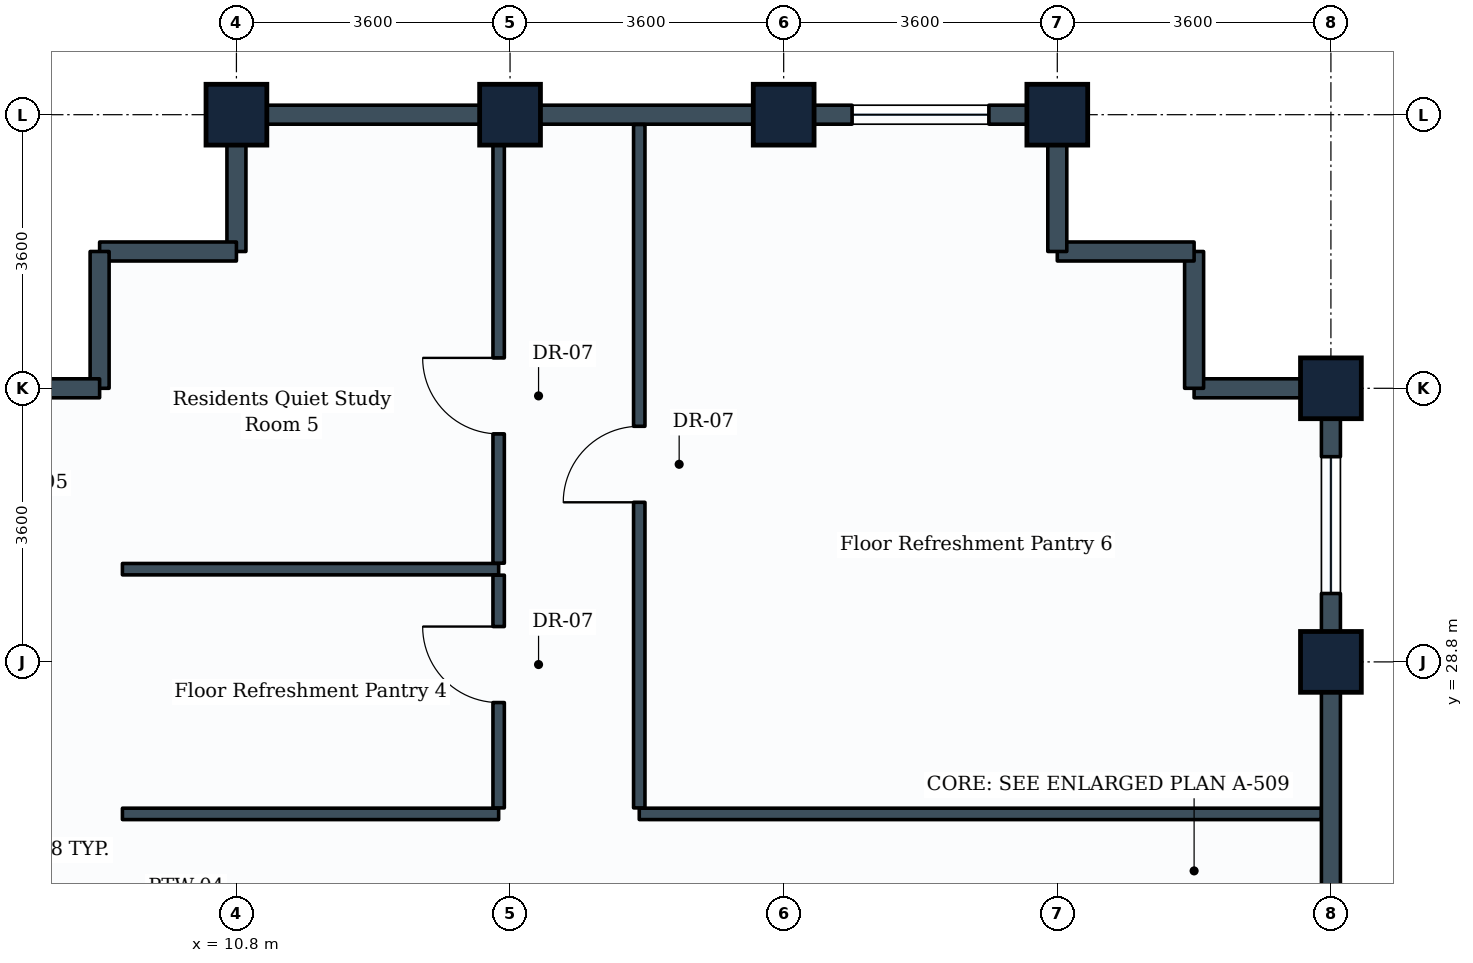
"""IFC4 building model, lengths in metres.
Left out: names, types, materials, properties, quantities, classifications, styles, units other than length and angle.
Written with IfcOpenShell. Run it as: python <this file> out.ifc"""

import sys

from ifc_helpers import new_model, si_unit, direction, frame, frame_2d, origin, origin_2d, place, context, subcontext, project, spatial, rectangle, extrude, element, fill, save


model = new_model("IFC4")
c1 = context("Model", 3, precision=1e-05, world=origin(), true_north=direction((0.0, 1.0)))
c2 = subcontext(c1, "Body", "Model", "MODEL_VIEW")
j1 = project(units=[si_unit("LENGTHUNIT", "METRE"), si_unit("PLANEANGLEUNIT", "RADIAN")], contexts=[c1])
p1 = place(None, origin())
s1 = spatial("IfcSite", under=j1, at=p1, CompositionType="ELEMENT")
p2 = place(p1, origin())
s2 = spatial("IfcBuilding", under=s1, at=p2, CompositionType="ELEMENT")
p3 = place(p2, frame((0.0, 0.0, 266.6)))
s3 = spatial("IfcBuildingStorey", under=s2, at=p3, CompositionType="ELEMENT", Elevation=266.6)
for number, where, z_axis, x_axis in (
    (1, (10.8, 36.0, 0.0), (0.0, 0.0, 1.0), (1.0, 0.0, 0.0)),
    (2, (14.4, 36.0, 0.0), (0.0, 0.0, 1.0), (1.0, 0.0, 0.0)),
    (3, (18.0, 36.0, 0.0), (0.0, 0.0, 1.0), (1.0, 0.0, 0.0)),
    (4, (21.6, 36.0, 0.0), (0.0, 0.0, 1.0), (1.0, 0.0, 0.0)),
    (5, (25.2, 28.8, 0.0), (0.0, 0.0, 1.0), (0.0, 1.0, 0.0)),
    (6, (25.2, 32.4, 0.0), (0.0, 0.0, 1.0), (0.0, 1.0, 0.0)),
):
    element("IfcColumn", number, at=place(p3, frame(where, z_axis=z_axis, x_axis=x_axis)), inside=s3, PredefinedType="COLUMN", context=c2, shape_type="SweptSolid", body=[
        extrude(rectangle(XDim=0.8, YDim=0.8, at=origin_2d()), origin(), (0.0, 0.0, 1.0), 3.6),
    ])
p4 = place(p3, frame((25.2, 28.8, 0.0), z_axis=(0.0, 0.0, 1.0), x_axis=(0.0, -1.0, 0.0)))
e7 = element("IfcWall", 7, at=p4, inside=s3, PredefinedType="STANDARD", context=c2, shape_type="SweptSolid", body=[
    extrude(rectangle(XDim=3.6, YDim=0.25, at=frame_2d((1.8, 0.0))), origin(), (0.0, 0.0, 1.0), 2.83),
])
p5 = place(p3, frame((25.2, 32.4, 0.0), z_axis=(0.0, 0.0, 1.0), x_axis=(0.0, -1.0, 0.0)))
e8 = element("IfcWall", 8, at=p5, inside=s3, PredefinedType="STANDARD", context=c2, shape_type="SweptSolid", body=[
    extrude(rectangle(XDim=3.6, YDim=0.25, at=frame_2d((1.8, 0.0))), origin(), (0.0, 0.0, 1.0), 2.83),
])
p6 = place(p5, frame((0.9, 0.0, 0.85)))
e9 = element("IfcOpeningElement", 9, at=p6, cuts=e8, PredefinedType="OPENING", context=c2, shape_type="SweptSolid", body=[
    extrude(rectangle(XDim=1.8, YDim=1.35, at=frame_2d((0.9, 0.675))), frame((0.0, 0.135, 0.0), z_axis=(0.0, -1.0, 0.0), x_axis=(1.0, 0.0, 0.0)), (0.0, 0.0, 1.0), 0.27),
])
p7 = place(p3, frame((23.4, 32.4, 0.0), z_axis=(0.0, 0.0, 1.0), x_axis=(1.0, 0.0, 0.0)))
e10 = element("IfcWall", 10, at=p7, inside=s3, PredefinedType="STANDARD", context=c2, shape_type="SweptSolid", body=[
    extrude(rectangle(XDim=1.8, YDim=0.25, at=frame_2d((0.9, 0.0))), origin(), (0.0, 0.0, 1.0), 2.83),
])
p8 = place(p3, frame((23.4, 32.4, 0.0), z_axis=(0.0, 0.0, 1.0), x_axis=(0.0, 1.0, 0.0)))
e11 = element("IfcWall", 11, at=p8, inside=s3, PredefinedType="STANDARD", context=c2, shape_type="SweptSolid", body=[
    extrude(rectangle(XDim=1.8, YDim=0.25, at=frame_2d((0.9, 0.0))), origin(), (0.0, 0.0, 1.0), 3.335),
])
p9 = place(p3, frame((21.6, 34.2, 0.0), z_axis=(0.0, 0.0, 1.0), x_axis=(1.0, 0.0, 0.0)))
e12 = element("IfcWall", 12, at=p9, inside=s3, PredefinedType="STANDARD", context=c2, shape_type="SweptSolid", body=[
    extrude(rectangle(XDim=1.8, YDim=0.25, at=frame_2d((0.9, 0.0))), origin(), (0.0, 0.0, 1.0), 3.335),
])
p10 = place(p3, frame((21.6, 34.2, 0.0), z_axis=(0.0, 0.0, 1.0), x_axis=(0.0, 1.0, 0.0)))
e13 = element("IfcWall", 13, at=p10, inside=s3, PredefinedType="STANDARD", context=c2, shape_type="SweptSolid", body=[
    extrude(rectangle(XDim=1.8, YDim=0.25, at=frame_2d((0.9, 0.0))), origin(), (0.0, 0.0, 1.0), 2.83),
])
p11 = place(p3, frame((18.0, 36.0, 0.0), z_axis=(0.0, 0.0, 1.0), x_axis=(1.0, 0.0, 0.0)))
e14 = element("IfcWall", 14, at=p11, inside=s3, PredefinedType="STANDARD", context=c2, shape_type="SweptSolid", body=[
    extrude(rectangle(XDim=3.6, YDim=0.25, at=frame_2d((1.8, 0.0))), origin(), (0.0, 0.0, 1.0), 2.83),
])
p12 = place(p11, frame((0.9, 0.0, 0.85)))
e15 = element("IfcOpeningElement", 15, at=p12, cuts=e14, PredefinedType="OPENING", context=c2, shape_type="SweptSolid", body=[
    extrude(rectangle(XDim=1.8, YDim=1.35, at=frame_2d((0.9, 0.675))), frame((0.0, 0.135, 0.0), z_axis=(0.0, -1.0, 0.0), x_axis=(1.0, 0.0, 0.0)), (0.0, 0.0, 1.0), 0.27),
])
p13 = place(p3, frame((14.4, 36.0, 0.0), z_axis=(0.0, 0.0, 1.0), x_axis=(1.0, 0.0, 0.0)))
e16 = element("IfcWall", 16, at=p13, inside=s3, PredefinedType="STANDARD", context=c2, shape_type="SweptSolid", body=[
    extrude(rectangle(XDim=3.6, YDim=0.25, at=frame_2d((1.8, 0.0))), origin(), (0.0, 0.0, 1.0), 2.83),
])
p14 = place(p3, frame((10.8, 36.0, 0.0), z_axis=(0.0, 0.0, 1.0), x_axis=(1.0, 0.0, 0.0)))
e17 = element("IfcWall", 17, at=p14, inside=s3, PredefinedType="STANDARD", context=c2, shape_type="SweptSolid", body=[
    extrude(rectangle(XDim=3.6, YDim=0.25, at=frame_2d((1.8, 0.0))), origin(), (0.0, 0.0, 1.0), 2.83),
])
p15 = place(p3, frame((10.8, 34.2, 0.0), z_axis=(0.0, 0.0, 1.0), x_axis=(0.0, 1.0, 0.0)))
e18 = element("IfcWall", 18, at=p15, inside=s3, PredefinedType="STANDARD", context=c2, shape_type="SweptSolid", body=[
    extrude(rectangle(XDim=1.8, YDim=0.25, at=frame_2d((0.9, 0.0))), origin(), (0.0, 0.0, 1.0), 2.83),
])
for number, where, z_axis, x_axis in (
    (19, (9.0, 34.2, 0.0), (0.0, 0.0, 1.0), (1.0, 0.0, 0.0)),
    (20, (9.0, 32.4, 0.0), (0.0, 0.0, 1.0), (0.0, 1.0, 0.0)),
):
    element("IfcWall", number, at=place(p3, frame(where, z_axis=z_axis, x_axis=x_axis)), inside=s3, PredefinedType="STANDARD", context=c2, shape_type="SweptSolid", body=[
        extrude(rectangle(XDim=1.8, YDim=0.25, at=frame_2d((0.9, 0.0))), origin(), (0.0, 0.0, 1.0), 3.335),
    ])
p16 = place(p3, frame((7.2, 32.4, 0.0), z_axis=(0.0, 0.0, 1.0), x_axis=(1.0, 0.0, 0.0)))
e21 = element("IfcWall", 21, at=p16, inside=s3, PredefinedType="STANDARD", context=c2, shape_type="SweptSolid", body=[
    extrude(rectangle(XDim=1.8, YDim=0.25, at=frame_2d((0.9, 0.0))), origin(), (0.0, 0.0, 1.0), 2.83),
])
for number, where, z_axis, x_axis in (
    (22, (9.3, 26.8, 0.0), (0.0, 0.0, 1.0), (1.0, 0.0, 0.0)),
    (23, (9.3, 30.02, 0.0), (0.0, 0.0, 1.0), (1.0, 0.0, 0.0)),
):
    element("IfcWall", number, at=place(p3, frame(where, z_axis=z_axis, x_axis=x_axis)), inside=s3, PredefinedType="PARTITIONING", context=c2, shape_type="SweptSolid", body=[
        extrude(rectangle(XDim=4.95, YDim=0.15, at=frame_2d((2.475, 0.0))), origin(), (0.0, 0.0, 1.0), 3.335),
    ])
p17 = place(p3, frame((14.25, 26.879, 0.0), z_axis=(0.0, 0.0, 1.0), x_axis=(0.0, 1.0, 0.0)))
e24 = element("IfcWall", 24, at=p17, inside=s3, PredefinedType="PARTITIONING", context=c2, shape_type="SweptSolid", body=[
    extrude(rectangle(XDim=3.062, YDim=0.15, at=frame_2d((1.531, 0.0))), origin(), (0.0, 0.0, 1.0), 3.03),
])
p18 = place(p17, frame((1.386, 0.0, 0.0)))
e25 = element("IfcOpeningElement", 25, at=p18, cuts=e24, PredefinedType="OPENING", context=c2, shape_type="SweptSolid", body=[
    extrude(rectangle(XDim=1.0, YDim=2.1, at=frame_2d((0.5, 1.05))), frame((0.0, 0.085, 0.0), z_axis=(0.0, -1.0, 0.0), x_axis=(1.0, 0.0, 0.0)), (0.0, 0.0, 1.0), 0.17),
])
p19 = place(p3, frame((14.25, 30.099, 0.0), z_axis=(0.0, 0.0, 1.0), x_axis=(0.0, 1.0, 0.0)))
e26 = element("IfcWall", 26, at=p19, inside=s3, PredefinedType="PARTITIONING", context=c2, shape_type="SweptSolid", body=[
    extrude(rectangle(XDim=5.772, YDim=0.15, at=frame_2d((2.886, 0.0))), origin(), (0.0, 0.0, 1.0), 2.83),
])
p20 = place(p19, frame((1.701, 0.0, 0.0)))
e27 = element("IfcOpeningElement", 27, at=p20, cuts=e26, PredefinedType="OPENING", context=c2, shape_type="SweptSolid", body=[
    extrude(rectangle(XDim=1.0, YDim=2.1, at=frame_2d((0.5, 1.05))), frame((0.0, 0.085, 0.0), z_axis=(0.0, -1.0, 0.0), x_axis=(1.0, 0.0, 0.0)), (0.0, 0.0, 1.0), 0.17),
])
p21 = place(p3, frame((16.1, 26.8, 0.0), z_axis=(0.0, 0.0, 1.0), x_axis=(1.0, 0.0, 0.0)))
e28 = element("IfcWall", 28, at=p21, inside=s3, PredefinedType="PARTITIONING", context=c2, shape_type="SweptSolid", body=[
    extrude(rectangle(XDim=8.971, YDim=0.15, at=frame_2d((4.485, 0.0))), origin(), (0.0, 0.0, 1.0), 2.83),
])
p22 = place(p3, frame((16.1, 26.879, 0.0), z_axis=(0.0, 0.0, 1.0), x_axis=(0.0, 1.0, 0.0)))
e29 = element("IfcWall", 29, at=p22, inside=s3, PredefinedType="PARTITIONING", context=c2, shape_type="SweptSolid", body=[
    extrude(rectangle(XDim=8.992, YDim=0.15, at=frame_2d((4.496, 0.0))), origin(), (0.0, 0.0, 1.0), 2.83),
])
p23 = place(p22, frame((4.021, 0.0, 0.0)))
e30 = element("IfcOpeningElement", 30, at=p23, cuts=e29, PredefinedType="OPENING", context=c2, shape_type="SweptSolid", body=[
    extrude(rectangle(XDim=1.0, YDim=2.1, at=frame_2d((0.5, 1.05))), frame((0.0, 0.085, 0.0), z_axis=(0.0, -1.0, 0.0), x_axis=(1.0, 0.0, 0.0)), (0.0, 0.0, 1.0), 0.17),
])
p24 = place(p6, origin())
e31 = element("IfcWindow", 31, at=p24, inside=s3, PartitioningType="SINGLE_PANEL", PredefinedType="WINDOW", context=c2, shape_type="SweptSolid", body=[
    extrude(rectangle(XDim=1.8, YDim=1.35, at=frame_2d((0.9, 0.675))), frame((0.0, 0.03, 0.0), z_axis=(0.0, -1.0, 0.0), x_axis=(1.0, 0.0, 0.0)), (0.0, 0.0, 1.0), 0.06),
])
fill(e9, e31)
p25 = place(p12, origin())
e32 = element("IfcWindow", 32, at=p25, inside=s3, PartitioningType="SINGLE_PANEL", PredefinedType="WINDOW", context=c2, shape_type="SweptSolid", body=[
    extrude(rectangle(XDim=1.8, YDim=1.35, at=frame_2d((0.9, 0.675))), frame((0.0, 0.03, 0.0), z_axis=(0.0, -1.0, 0.0), x_axis=(1.0, 0.0, 0.0)), (0.0, 0.0, 1.0), 0.06),
])
fill(e15, e32)
p26 = place(p18, origin())
e33 = element("IfcDoor", 33, at=p26, inside=s3, OperationType="SINGLE_SWING_RIGHT", PredefinedType="DOOR", context=c2, shape_type="SweptSolid", body=[
    extrude(rectangle(XDim=1.0, YDim=2.1, at=frame_2d((0.5, 1.05))), frame((0.0, 0.025, 0.0), z_axis=(0.0, -1.0, 0.0), x_axis=(1.0, 0.0, 0.0)), (0.0, 0.0, 1.0), 0.05),
])
fill(e25, e33)
p27 = place(p20, origin())
e34 = element("IfcDoor", 34, at=p27, inside=s3, OperationType="SINGLE_SWING_RIGHT", PredefinedType="DOOR", context=c2, shape_type="SweptSolid", body=[
    extrude(rectangle(XDim=1.0, YDim=2.1, at=frame_2d((0.5, 1.05))), frame((0.0, 0.025, 0.0), z_axis=(0.0, -1.0, 0.0), x_axis=(1.0, 0.0, 0.0)), (0.0, 0.0, 1.0), 0.05),
])
fill(e27, e34)
p28 = place(p23, origin())
e35 = element("IfcDoor", 35, at=p28, inside=s3, OperationType="SINGLE_SWING_LEFT", PredefinedType="DOOR", context=c2, shape_type="SweptSolid", body=[
    extrude(rectangle(XDim=1.0, YDim=2.1, at=frame_2d((0.5, 1.05))), frame((0.0, 0.025, 0.0), z_axis=(0.0, -1.0, 0.0), x_axis=(1.0, 0.0, 0.0)), (0.0, 0.0, 1.0), 0.05),
])
fill(e30, e35)
save(model, sys.argv[1])
